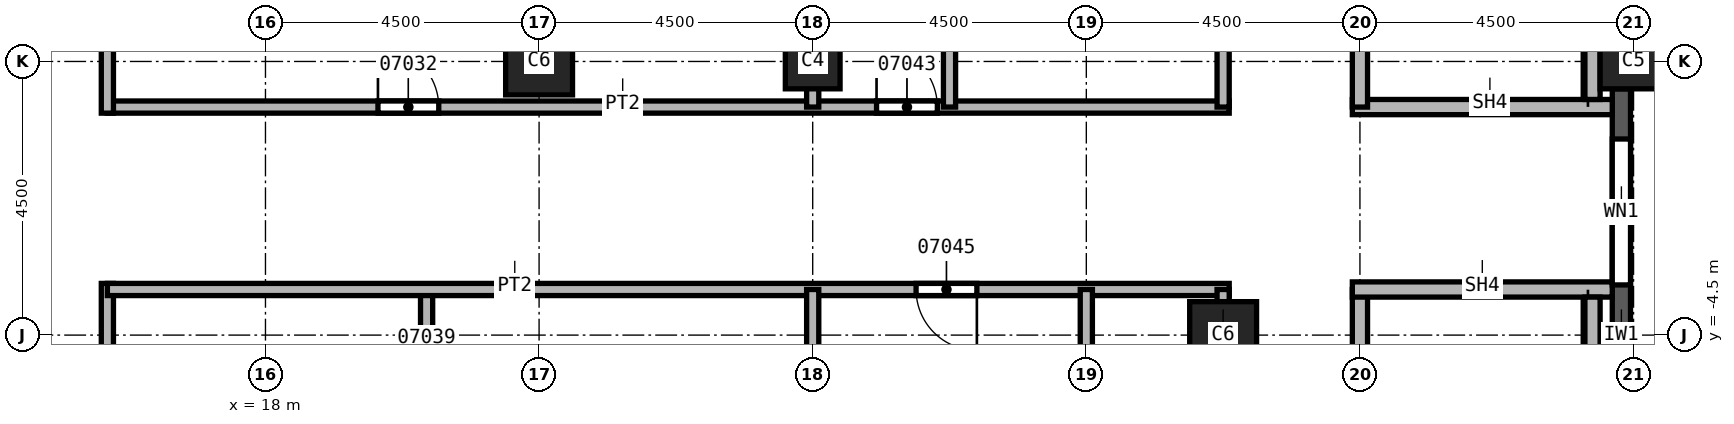
"""IFC4 building model, lengths in metres.
Left out: names, types, materials, properties, quantities, classifications, styles, units other than length and angle.
Written with IfcOpenShell. Run it as: python <this file> out.ifc"""

import sys

from ifc_helpers import new_model, si_unit, direction, frame, frame_2d, origin, origin_2d, place, context, subcontext, project, spatial, rectangle, extrude, element, fill, save


model = new_model("IFC4")
c1 = context("Model", 3, precision=1e-05, world=origin(), true_north=direction((0.0, 1.0)))
c2 = subcontext(c1, "Body", "Model", "MODEL_VIEW")
j1 = project(units=[si_unit("LENGTHUNIT", "METRE"), si_unit("PLANEANGLEUNIT", "RADIAN")], contexts=[c1])
p1 = place(None, origin())
s1 = spatial("IfcSite", under=j1, at=p1, CompositionType="ELEMENT")
p2 = place(p1, origin())
s2 = spatial("IfcBuilding", under=s1, at=p2, CompositionType="ELEMENT")
p3 = place(p2, frame((0.0, 0.0, 138.0)))
s3 = spatial("IfcBuildingStorey", under=s2, at=p3, CompositionType="ELEMENT", Elevation=138.0)
p4 = place(p3, frame((40.5, 0.0, 0.0), z_axis=(0.0, 0.0, 1.0), x_axis=(0.0, 1.0, 0.0)))
e1 = element("IfcColumn", 1, at=p4, inside=s3, PredefinedType="COLUMN", context=c2, shape_type="SweptSolid", body=[
    extrude(rectangle(XDim=0.9, YDim=1.1, at=origin_2d()), origin(), (0.0, 0.0, 1.0), 3.7),
])
for number, where, z_axis, x_axis in (
    (2, (33.75, -4.5, 0.0), (0.0, 0.0, 1.0), (1.0, 0.0, 0.0)),
    (3, (22.5, 0.0, 0.0), (0.0, 0.0, 1.0), (1.0, 0.0, 0.0)),
):
    element("IfcColumn", number, at=place(p3, frame(where, z_axis=z_axis, x_axis=x_axis)), inside=s3, PredefinedType="COLUMN", context=c2, shape_type="SweptSolid", body=[
        extrude(rectangle(XDim=1.1, YDim=1.1, at=origin_2d()), origin(), (0.0, 0.0, 1.0), 3.7),
    ])
p5 = place(p3, frame((27.0, 0.0, 0.0), z_axis=(0.0, 0.0, 1.0), x_axis=(1.0, 0.0, 0.0)))
e4 = element("IfcColumn", 4, at=p5, inside=s3, PredefinedType="COLUMN", context=c2, shape_type="SweptSolid", body=[
    extrude(rectangle(XDim=0.9, YDim=0.9, at=origin_2d()), origin(), (0.0, 0.0, 1.0), 3.7),
])
p6 = place(p3, frame((40.3, -8.55, 0.0), z_axis=(0.0, 0.0, 1.0), x_axis=(0.0, 1.0, 0.0)))
e5 = element("IfcWall", 5, at=p6, inside=s3, PredefinedType="SOLIDWALL", context=c2, shape_type="SweptSolid", body=[
    extrude(rectangle(XDim=8.1, YDim=0.3, at=frame_2d((4.05, 0.0))), origin(), (0.0, 0.0, 1.0), 3.1),
])
p7 = place(p6, frame((0.825, 0.0, 0.8)))
e6 = element("IfcOpeningElement", 6, at=p7, cuts=e5, PredefinedType="OPENING", context=c2, shape_type="SweptSolid", body=[
    extrude(rectangle(XDim=2.4, YDim=1.95, at=frame_2d((1.2, 0.975))), frame((0.0, 0.15, 0.0), z_axis=(0.0, -1.0, 0.0), x_axis=(1.0, 0.0, 0.0)), (0.0, 0.0, 1.0), 0.3),
])
p8 = place(p6, frame((4.875, 0.0, 0.8)))
e7 = element("IfcOpeningElement", 7, at=p8, cuts=e5, PredefinedType="OPENING", context=c2, shape_type="SweptSolid", body=[
    extrude(rectangle(XDim=2.4, YDim=1.95, at=frame_2d((1.2, 0.975))), frame((0.0, 0.15, 0.0), z_axis=(0.0, -1.0, 0.0), x_axis=(1.0, 0.0, 0.0)), (0.0, 0.0, 1.0), 0.3),
])
p9 = place(p3, frame((15.4, -3.65, 0.0), z_axis=(0.0, 0.0, 1.0), x_axis=(0.0, -1.0, 0.0)))
e8 = element("IfcWall", 8, at=p9, inside=s3, PredefinedType="PARTITIONING", context=c2, shape_type="SweptSolid", body=[
    extrude(rectangle(XDim=19.6, YDim=0.2, at=frame_2d((9.8, 0.0))), origin(), (0.0, 0.0, 1.0), 3.7),
])
p10 = place(p9, frame((18.3, 0.0, 0.0)))
e9 = element("IfcOpeningElement", 9, at=p10, cuts=e8, PredefinedType="OPENING", context=c2, shape_type="SweptSolid", body=[
    extrude(rectangle(XDim=1.0, YDim=2.1, at=frame_2d((0.5, 1.05))), frame((0.0, 0.1, 0.0), z_axis=(0.0, -1.0, 0.0), x_axis=(1.0, 0.0, 0.0)), (0.0, 0.0, 1.0), 0.2),
])
p11 = place(p9, frame((10.6, 0.0, 0.0)))
e10 = element("IfcOpeningElement", 10, at=p11, cuts=e8, PredefinedType="OPENING", context=c2, shape_type="SweptSolid", body=[
    extrude(rectangle(XDim=1.0, YDim=2.1, at=frame_2d((0.5, 1.05))), frame((0.0, 0.1, 0.0), z_axis=(0.0, -1.0, 0.0), x_axis=(1.0, 0.0, 0.0)), (0.0, 0.0, 1.0), 0.2),
])
p12 = place(p9, frame((2.2, 0.0, 0.0)))
e11 = element("IfcOpeningElement", 11, at=p12, cuts=e8, PredefinedType="OPENING", context=c2, shape_type="SweptSolid", body=[
    extrude(rectangle(XDim=1.0, YDim=2.1, at=frame_2d((0.5, 1.05))), frame((0.0, 0.1, 0.0), z_axis=(0.0, -1.0, 0.0), x_axis=(1.0, 0.0, 0.0)), (0.0, 0.0, 1.0), 0.2),
])
p13 = place(p3, frame((15.4, -0.75, 0.0), z_axis=(0.0, 0.0, 1.0), x_axis=(1.0, 0.0, 0.0)))
e12 = element("IfcWall", 12, at=p13, inside=s3, PredefinedType="PARTITIONING", context=c2, shape_type="SweptSolid", body=[
    extrude(rectangle(XDim=18.45, YDim=0.2, at=frame_2d((9.225, 0.0))), origin(), (0.0, 0.0, 1.0), 3.7),
])
p14 = place(p13, frame((4.45, 0.0, 0.0)))
e13 = element("IfcOpeningElement", 13, at=p14, cuts=e12, PredefinedType="OPENING", context=c2, shape_type="SweptSolid", body=[
    extrude(rectangle(XDim=1.0, YDim=2.1, at=frame_2d((0.5, 1.05))), frame((0.0, 0.1, 0.0), z_axis=(0.0, -1.0, 0.0), x_axis=(1.0, 0.0, 0.0)), (0.0, 0.0, 1.0), 0.2),
])
p15 = place(p13, frame((12.65, 0.0, 0.0)))
e14 = element("IfcOpeningElement", 14, at=p15, cuts=e12, PredefinedType="OPENING", context=c2, shape_type="SweptSolid", body=[
    extrude(rectangle(XDim=1.0, YDim=2.1, at=frame_2d((0.5, 1.05))), frame((0.0, 0.1, 0.0), z_axis=(0.0, -1.0, 0.0), x_axis=(1.0, 0.0, 0.0)), (0.0, 0.0, 1.0), 0.2),
])
p16 = place(p3, frame((15.4, 23.25, 0.0), z_axis=(0.0, 0.0, 1.0), x_axis=(0.0, -1.0, 0.0)))
e15 = element("IfcWall", 15, at=p16, inside=s3, PredefinedType="PARTITIONING", context=c2, shape_type="SweptSolid", body=[
    extrude(rectangle(XDim=24.1, YDim=0.2, at=frame_2d((12.05, 0.0))), origin(), (0.0, 0.0, 1.0), 3.7),
])
p17 = place(p16, frame((8.55, 0.0, 0.0)))
e16 = element("IfcOpeningElement", 16, at=p17, cuts=e15, PredefinedType="OPENING", context=c2, shape_type="SweptSolid", body=[
    extrude(rectangle(XDim=1.0, YDim=2.1, at=frame_2d((0.5, 1.05))), frame((0.0, 0.1, 0.0), z_axis=(0.0, -1.0, 0.0), x_axis=(1.0, 0.0, 0.0)), (0.0, 0.0, 1.0), 0.2),
])
p18 = place(p16, frame((0.55, 0.0, 0.0)))
e17 = element("IfcOpeningElement", 17, at=p18, cuts=e15, PredefinedType="OPENING", context=c2, shape_type="SweptSolid", body=[
    extrude(rectangle(XDim=1.0, YDim=2.1, at=frame_2d((0.5, 1.05))), frame((0.0, 0.1, 0.0), z_axis=(0.0, -1.0, 0.0), x_axis=(1.0, 0.0, 0.0)), (0.0, 0.0, 1.0), 0.2),
])
p19 = place(p3, frame((20.65, -3.75, 0.0), z_axis=(0.0, 0.0, 1.0), x_axis=(0.0, -1.0, 0.0)))
e18 = element("IfcWall", 18, at=p19, inside=s3, PredefinedType="PARTITIONING", context=c2, shape_type="SweptSolid", body=[
    extrude(rectangle(XDim=5.25, YDim=0.2, at=frame_2d((2.625, 0.0))), origin(), (0.0, 0.0, 1.0), 3.7),
])
p20 = place(p19, frame((1.3, 0.0, 0.0)))
e19 = element("IfcOpeningElement", 19, at=p20, cuts=e18, PredefinedType="OPENING", context=c2, shape_type="SweptSolid", body=[
    extrude(rectangle(XDim=1.0, YDim=2.1, at=frame_2d((0.5, 1.05))), frame((0.0, 0.1, 0.0), z_axis=(0.0, -1.0, 0.0), x_axis=(1.0, 0.0, 0.0)), (0.0, 0.0, 1.0), 0.2),
])
p21 = place(p3, frame((33.85, -3.75, 0.0), z_axis=(0.0, 0.0, 1.0), x_axis=(-1.0, 0.0, 0.0)))
e20 = element("IfcWall", 20, at=p21, inside=s3, PredefinedType="PARTITIONING", context=c2, shape_type="SweptSolid", body=[
    extrude(rectangle(XDim=18.45, YDim=0.2, at=frame_2d((9.225, 0.0))), origin(), (0.0, 0.0, 1.0), 3.7),
])
p22 = place(p21, frame((4.15, 0.0, 0.0)))
e21 = element("IfcOpeningElement", 21, at=p22, cuts=e20, PredefinedType="OPENING", context=c2, shape_type="SweptSolid", body=[
    extrude(rectangle(XDim=1.0, YDim=2.1, at=frame_2d((0.5, 1.05))), frame((0.0, 0.1, 0.0), z_axis=(0.0, -1.0, 0.0), x_axis=(1.0, 0.0, 0.0)), (0.0, 0.0, 1.0), 0.2),
])
p23 = place(p3, frame((27.0, -3.75, 0.0), z_axis=(0.0, 0.0, 1.0), x_axis=(0.0, -1.0, 0.0)))
e22 = element("IfcWall", 22, at=p23, inside=s3, PredefinedType="PARTITIONING", context=c2, shape_type="SweptSolid", body=[
    extrude(rectangle(XDim=13.7, YDim=0.2, at=frame_2d((6.85, 0.0))), origin(), (0.0, 0.0, 1.0), 3.7),
])
p24 = place(p3, frame((27.0, 17.45, 0.0), z_axis=(0.0, 0.0, 1.0), x_axis=(0.0, -1.0, 0.0)))
e23 = element("IfcWall", 23, at=p24, inside=s3, PredefinedType="PARTITIONING", context=c2, shape_type="SweptSolid", body=[
    extrude(rectangle(XDim=18.2, YDim=0.2, at=frame_2d((9.1, 0.0))), origin(), (0.0, 0.0, 1.0), 3.7),
])
p25 = place(p3, frame((29.25, 17.65, 0.0), z_axis=(0.0, 0.0, 1.0), x_axis=(0.0, -1.0, 0.0)))
e24 = element("IfcWall", 24, at=p25, inside=s3, PredefinedType="PARTITIONING", context=c2, shape_type="SweptSolid", body=[
    extrude(rectangle(XDim=18.4, YDim=0.2, at=frame_2d((9.2, 0.0))), origin(), (0.0, 0.0, 1.0), 3.7),
])
p26 = place(p3, frame((31.5, -3.75, 0.0), z_axis=(0.0, 0.0, 1.0), x_axis=(0.0, -1.0, 0.0)))
e25 = element("IfcWall", 25, at=p26, inside=s3, PredefinedType="PARTITIONING", context=c2, shape_type="SweptSolid", body=[
    extrude(rectangle(XDim=13.7, YDim=0.2, at=frame_2d((6.85, 0.0))), origin(), (0.0, 0.0, 1.0), 3.7),
])
p27 = place(p3, frame((33.75, -11.25, 0.0), z_axis=(0.0, 0.0, 1.0), x_axis=(0.0, 1.0, 0.0)))
e26 = element("IfcWall", 26, at=p27, inside=s3, PredefinedType="PARTITIONING", context=c2, shape_type="SweptSolid", body=[
    extrude(rectangle(XDim=7.5, YDim=0.2, at=frame_2d((3.75, 0.0))), origin(), (0.0, 0.0, 1.0), 3.7),
])
p28 = place(p27, frame((2.35, 0.0, 0.0)))
e27 = element("IfcOpeningElement", 27, at=p28, cuts=e26, PredefinedType="OPENING", context=c2, shape_type="SweptSolid", body=[
    extrude(rectangle(XDim=1.0, YDim=2.1, at=frame_2d((0.5, 1.05))), frame((0.0, 0.1, 0.0), z_axis=(0.0, -1.0, 0.0), x_axis=(1.0, 0.0, 0.0)), (0.0, 0.0, 1.0), 0.2),
])
p29 = place(p3, frame((33.75, -0.75, 0.0), z_axis=(0.0, 0.0, 1.0), x_axis=(0.0, 1.0, 0.0)))
e28 = element("IfcWall", 28, at=p29, inside=s3, PredefinedType="PARTITIONING", context=c2, shape_type="SweptSolid", body=[
    extrude(rectangle(XDim=7.5, YDim=0.2, at=frame_2d((3.75, 0.0))), origin(), (0.0, 0.0, 1.0), 3.7),
])
p30 = place(p29, frame((3.4, 0.0, 0.0)))
e29 = element("IfcOpeningElement", 29, at=p30, cuts=e28, PredefinedType="OPENING", context=c2, shape_type="SweptSolid", body=[
    extrude(rectangle(XDim=1.0, YDim=2.1, at=frame_2d((0.5, 1.05))), frame((0.0, 0.1, 0.0), z_axis=(0.0, -1.0, 0.0), x_axis=(1.0, 0.0, 0.0)), (0.0, 0.0, 1.0), 0.2),
])
p31 = place(p3, frame((35.875, -0.75, 0.0), z_axis=(0.0, 0.0, 1.0), x_axis=(1.0, 0.0, 0.0)))
e30 = element("IfcWall", 30, at=p31, inside=s3, PredefinedType="SOLIDWALL", context=c2, shape_type="SweptSolid", body=[
    extrude(rectangle(XDim=4.275, YDim=0.25, at=frame_2d((2.137, 0.0))), origin(), (0.0, 0.0, 1.0), 3.7),
])
p32 = place(p3, frame((36.0, -11.375, 0.0), z_axis=(0.0, 0.0, 1.0), x_axis=(0.0, 1.0, 0.0)))
e31 = element("IfcWall", 31, at=p32, inside=s3, PredefinedType="SOLIDWALL", context=c2, shape_type="SweptSolid", body=[
    extrude(rectangle(XDim=7.625, YDim=0.25, at=frame_2d((3.812, 0.0))), origin(), (0.0, 0.0, 1.0), 3.7),
])
p33 = place(p32, frame((0.4, 0.0, 0.0)))
e32 = element("IfcOpeningElement", 32, at=p33, cuts=e31, PredefinedType="OPENING", context=c2, shape_type="SweptSolid", body=[
    extrude(rectangle(XDim=1.2, YDim=2.1, at=frame_2d((0.6, 1.05))), frame((0.0, 0.125, 0.0), z_axis=(0.0, -1.0, 0.0), x_axis=(1.0, 0.0, 0.0)), (0.0, 0.0, 1.0), 0.25),
])
p34 = place(p3, frame((36.0, -0.75, 0.0), z_axis=(0.0, 0.0, 1.0), x_axis=(0.0, 1.0, 0.0)))
e33 = element("IfcWall", 33, at=p34, inside=s3, PredefinedType="SOLIDWALL", context=c2, shape_type="SweptSolid", body=[
    extrude(rectangle(XDim=7.625, YDim=0.25, at=frame_2d((3.812, 0.0))), origin(), (0.0, 0.0, 1.0), 3.7),
])
p35 = place(p34, frame((5.95, 0.0, 0.0)))
e34 = element("IfcOpeningElement", 34, at=p35, cuts=e33, PredefinedType="OPENING", context=c2, shape_type="SweptSolid", body=[
    extrude(rectangle(XDim=1.2, YDim=2.1, at=frame_2d((0.6, 1.05))), frame((0.0, 0.125, 0.0), z_axis=(0.0, -1.0, 0.0), x_axis=(1.0, 0.0, 0.0)), (0.0, 0.0, 1.0), 0.25),
])
p36 = place(p3, frame((40.15, -3.75, 0.0), z_axis=(0.0, 0.0, 1.0), x_axis=(-1.0, 0.0, 0.0)))
e35 = element("IfcWall", 35, at=p36, inside=s3, PredefinedType="SOLIDWALL", context=c2, shape_type="SweptSolid", body=[
    extrude(rectangle(XDim=4.275, YDim=0.25, at=frame_2d((2.137, 0.0))), origin(), (0.0, 0.0, 1.0), 3.7),
])
for number, where, z_axis, x_axis in (
    (36, (39.825, -11.125, 0.0), (0.0, 0.0, 1.0), (0.0, 1.0, 0.0)),
    (37, (39.825, -0.625, 0.0), (0.0, 0.0, 1.0), (0.0, 1.0, 0.0)),
):
    element("IfcWall", number, at=place(p3, frame(where, z_axis=z_axis, x_axis=x_axis)), inside=s3, PredefinedType="SOLIDWALL", context=c2, shape_type="SweptSolid", body=[
        extrude(rectangle(XDim=7.25, YDim=0.25, at=frame_2d((3.625, 0.0))), origin(), (0.0, 0.0, 1.0), 3.7),
    ])
p37 = place(p8, origin())
e38 = element("IfcWindow", 38, at=p37, inside=s3, PartitioningType="SINGLE_PANEL", PredefinedType="WINDOW", context=c2, shape_type="SweptSolid", body=[
    extrude(rectangle(XDim=2.4, YDim=1.95, at=frame_2d((1.2, 0.975))), frame((0.0, 0.03, 0.0), z_axis=(0.0, -1.0, 0.0), x_axis=(1.0, 0.0, 0.0)), (0.0, 0.0, 1.0), 0.06),
])
fill(e7, e38)
p38 = place(p14, origin())
e39 = element("IfcDoor", 39, at=p38, inside=s3, OperationType="SINGLE_SWING_LEFT", PredefinedType="DOOR", context=c2, shape_type="SweptSolid", body=[
    extrude(rectangle(XDim=1.0, YDim=2.1, at=frame_2d((0.5, 1.05))), frame((0.0, 0.025, 0.0), z_axis=(0.0, -1.0, 0.0), x_axis=(1.0, 0.0, 0.0)), (0.0, 0.0, 1.0), 0.05),
])
fill(e13, e39)
p39 = place(p15, origin())
e40 = element("IfcDoor", 40, at=p39, inside=s3, OperationType="SINGLE_SWING_RIGHT", PredefinedType="DOOR", context=c2, shape_type="SweptSolid", body=[
    extrude(rectangle(XDim=1.0, YDim=2.1, at=frame_2d((0.5, 1.05))), frame((0.0, 0.025, 0.0), z_axis=(0.0, -1.0, 0.0), x_axis=(1.0, 0.0, 0.0)), (0.0, 0.0, 1.0), 0.05),
])
fill(e14, e40)
p40 = place(p22, origin())
e41 = element("IfcDoor", 41, at=p40, inside=s3, OperationType="SINGLE_SWING_RIGHT", PredefinedType="DOOR", context=c2, shape_type="SweptSolid", body=[
    extrude(rectangle(XDim=1.0, YDim=2.1, at=frame_2d((0.5, 1.05))), frame((0.0, 0.025, 0.0), z_axis=(0.0, -1.0, 0.0), x_axis=(1.0, 0.0, 0.0)), (0.0, 0.0, 1.0), 0.05),
])
fill(e21, e41)
save(model, sys.argv[1])
